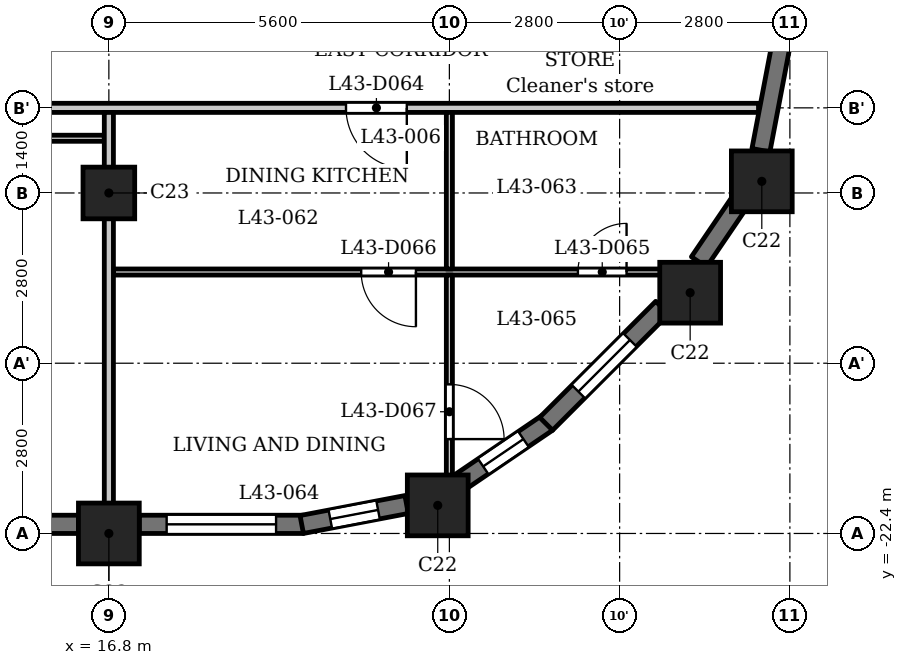
"""IFC4 building model, lengths in metres.
Left out: names, types, materials, properties, quantities, classifications, styles, units other than length and angle.
Written with IfcOpenShell. Run it as: python <this file> out.ifc"""

import sys

from ifc_helpers import new_model, si_unit, direction, frame, frame_2d, origin, origin_2d, place, context, subcontext, project, spatial, rectangle, extrude, element, fill, save


model = new_model("IFC4")
c1 = context("Model", 3, precision=1e-05, world=origin(), true_north=direction((0.0, 1.0)))
c2 = subcontext(c1, "Body", "Model", "MODEL_VIEW")
j1 = project(units=[si_unit("LENGTHUNIT", "METRE"), si_unit("PLANEANGLEUNIT", "RADIAN")], contexts=[c1])
p1 = place(None, origin())
s1 = spatial("IfcSite", under=j1, at=p1, CompositionType="ELEMENT")
p2 = place(p1, origin())
s2 = spatial("IfcBuilding", under=s1, at=p2, CompositionType="ELEMENT")
p3 = place(p2, frame((0.0, 0.0, 167.6)))
s3 = spatial("IfcBuildingStorey", under=s2, at=p3, CompositionType="ELEMENT", Elevation=167.6)
for number, where, z_axis, x_axis in (
    (1, (16.8, -22.4, 0.0), (0.0, 0.0, 1.0), (1.0, 0.0, 0.0)),
    (2, (22.209, -21.938, 0.0), (0.0, 0.0, 1.0), (1.0, 0.0, 0.0)),
    (3, (26.36, -18.44, 0.0), (0.0, 0.0, 1.0), (1.0, 0.0, 0.0)),
    (4, (27.538, -16.609, 0.0), (0.0, 0.0, 1.0), (1.0, 0.0, 0.0)),
):
    element("IfcColumn", number, at=place(p3, frame(where, z_axis=z_axis, x_axis=x_axis)), inside=s3, PredefinedType="COLUMN", context=c2, shape_type="SweptSolid", body=[
        extrude(rectangle(XDim=1.0, YDim=1.0, at=origin_2d()), origin(), (0.0, 0.0, 1.0), 3.5),
    ])
p4 = place(p3, frame((16.8, -16.8, 0.0), z_axis=(0.0, 0.0, 1.0), x_axis=(1.0, 0.0, 0.0)))
e5 = element("IfcColumn", 5, at=p4, inside=s3, PredefinedType="COLUMN", context=c2, shape_type="SweptSolid", body=[
    extrude(rectangle(XDim=0.85, YDim=0.85, at=origin_2d()), origin(), (0.0, 0.0, 1.0), 3.5),
])
p5 = place(p3, frame((11.7, -22.25, 0.0), z_axis=(0.0, 0.0, 1.0), x_axis=(1.0, 0.0, 0.0)))
e6 = element("IfcWall", 6, at=p5, inside=s3, PredefinedType="SOLIDWALL", context=c2, shape_type="SweptSolid", body=[
    extrude(rectangle(XDim=4.6, YDim=0.3, at=frame_2d((2.3, 0.0))), origin(), (0.0, 0.0, 1.0), 2.45),
])
p6 = place(p5, frame((0.5, 0.0, 1.2)))
e7 = element("IfcOpeningElement", 7, at=p6, cuts=e6, PredefinedType="OPENING", context=c2, shape_type="SweptSolid", body=[
    extrude(rectangle(XDim=3.6, YDim=0.95, at=frame_2d((1.8, 0.475))), frame((0.0, 0.16, 0.0), z_axis=(0.0, -1.0, 0.0), x_axis=(1.0, 0.0, 0.0)), (0.0, 0.0, 1.0), 0.32),
])
p7 = place(p3, frame((17.3, -22.25, 0.0), z_axis=(0.0, 0.0, 1.0), x_axis=(1.0, 0.0, 0.0)))
e8 = element("IfcWall", 8, at=p7, inside=s3, PredefinedType="SOLIDWALL", context=c2, shape_type="SweptSolid", body=[
    extrude(rectangle(XDim=2.7, YDim=0.3, at=frame_2d((1.35, 0.0))), origin(), (0.0, 0.0, 1.0), 2.45),
])
p8 = place(p7, frame((0.45, 0.0, 0.9)))
e9 = element("IfcOpeningElement", 9, at=p8, cuts=e8, PredefinedType="OPENING", context=c2, shape_type="SweptSolid", body=[
    extrude(rectangle(XDim=1.8, YDim=1.25, at=frame_2d((0.9, 0.625))), frame((0.0, 0.16, 0.0), z_axis=(0.0, -1.0, 0.0), x_axis=(1.0, 0.0, 0.0)), (0.0, 0.0, 1.0), 0.32),
])
p9 = place(p3, frame((19.972, -22.253, 0.0), z_axis=(0.0, 0.0, 1.0), x_axis=(0.982284988433, 0.187393173565, 0.0)))
e10 = element("IfcWall", 10, at=p9, inside=s3, PredefinedType="SOLIDWALL", context=c2, shape_type="SweptSolid", body=[
    extrude(rectangle(XDim=1.756, YDim=0.3, at=frame_2d((0.878, 0.0))), origin(), (0.0, 0.0, 1.0), 2.45),
])
p10 = place(p9, frame((0.478, 0.0, 0.6)))
e11 = element("IfcOpeningElement", 11, at=p10, cuts=e10, PredefinedType="OPENING", context=c2, shape_type="SweptSolid", body=[
    extrude(rectangle(XDim=0.8, YDim=1.55, at=frame_2d((0.4, 0.775))), frame((0.0, 0.16, 0.0), z_axis=(0.0, -1.0, 0.0), x_axis=(1.0, 0.0, 0.0)), (0.0, 0.0, 1.0), 0.32),
])
p11 = place(p3, frame((22.56, -21.566, 0.0), z_axis=(0.0, 0.0, 1.0), x_axis=(0.82707645233, 0.562089443061, 0.0)))
e12 = element("IfcWall", 12, at=p11, inside=s3, PredefinedType="SOLIDWALL", context=c2, shape_type="SweptSolid", body=[
    extrude(rectangle(XDim=1.756, YDim=0.3, at=frame_2d((0.878, 0.0))), origin(), (0.0, 0.0, 1.0), 2.45),
])
p12 = place(p11, frame((0.478, 0.0, 0.6)))
e13 = element("IfcOpeningElement", 13, at=p12, cuts=e12, PredefinedType="OPENING", context=c2, shape_type="SweptSolid", body=[
    extrude(rectangle(XDim=0.8, YDim=1.55, at=frame_2d((0.4, 0.775))), frame((0.0, 0.16, 0.0), z_axis=(0.0, -1.0, 0.0), x_axis=(1.0, 0.0, 0.0)), (0.0, 0.0, 1.0), 0.32),
])
p13 = place(p3, frame((23.991, -20.597, 0.0), z_axis=(0.0, 0.0, 1.0), x_axis=(0.707106781187, 0.707106781187, 0.0)))
e14 = element("IfcWall", 14, at=p13, inside=s3, PredefinedType="SOLIDWALL", context=c2, shape_type="SweptSolid", body=[
    extrude(rectangle(XDim=2.7, YDim=0.3, at=frame_2d((1.35, 0.0))), origin(), (0.0, 0.0, 1.0), 2.45),
])
p14 = place(p13, frame((0.75, 0.0, 0.6)))
e15 = element("IfcOpeningElement", 15, at=p14, cuts=e14, PredefinedType="OPENING", context=c2, shape_type="SweptSolid", body=[
    extrude(rectangle(XDim=1.2, YDim=1.55, at=frame_2d((0.6, 0.775))), frame((0.0, 0.16, 0.0), z_axis=(0.0, -1.0, 0.0), x_axis=(1.0, 0.0, 0.0)), (0.0, 0.0, 1.0), 0.32),
])
p15 = place(p3, frame((26.504, -17.934, 0.0), z_axis=(0.0, 0.0, 1.0), x_axis=(0.562145470373, 0.827038372833, 0.0)))
e16 = element("IfcWall", 16, at=p15, inside=s3, PredefinedType="SOLIDWALL", context=c2, shape_type="SweptSolid", body=[
    extrude(rectangle(XDim=1.177, YDim=0.3, at=frame_2d((0.588, 0.0))), origin(), (0.0, 0.0, 1.0), 3.2),
])
p16 = place(p3, frame((27.524, -16.097, 0.0), z_axis=(0.0, 0.0, 1.0), x_axis=(0.187259034321, 0.982310569049, 0.0)))
e17 = element("IfcWall", 17, at=p16, inside=s3, PredefinedType="SOLIDWALL", context=c2, shape_type="SweptSolid", body=[
    extrude(rectangle(XDim=1.756, YDim=0.3, at=frame_2d((0.878, 0.0))), origin(), (0.0, 0.0, 1.0), 2.45),
])
p17 = place(p3, frame((16.875, -18.1, 0.0), z_axis=(0.0, 0.0, 1.0), x_axis=(1.0, 0.0, 0.0)))
e18 = element("IfcWall", 18, at=p17, inside=s3, PredefinedType="PARTITIONING", context=c2, shape_type="SweptSolid", body=[
    extrude(rectangle(XDim=9.565, YDim=0.1, at=frame_2d((4.782, 0.0))), origin(), (0.0, 0.0, 1.0), 3.2),
])
p18 = place(p17, frame((7.639, 0.0, 0.0)))
e19 = element("IfcOpeningElement", 19, at=p18, cuts=e18, PredefinedType="OPENING", context=c2, shape_type="SweptSolid", body=[
    extrude(rectangle(XDim=0.8, YDim=2.1, at=frame_2d((0.4, 1.05))), frame((0.0, 0.06, 0.0), z_axis=(0.0, -1.0, 0.0), x_axis=(1.0, 0.0, 0.0)), (0.0, 0.0, 1.0), 0.12),
])
p19 = place(p17, frame((4.075, 0.0, 0.0)))
e20 = element("IfcOpeningElement", 20, at=p19, cuts=e18, PredefinedType="OPENING", context=c2, shape_type="SweptSolid", body=[
    extrude(rectangle(XDim=0.9, YDim=2.1, at=frame_2d((0.45, 1.05))), frame((0.0, 0.06, 0.0), z_axis=(0.0, -1.0, 0.0), x_axis=(1.0, 0.0, 0.0)), (0.0, 0.0, 1.0), 0.12),
])
p20 = place(p3, frame((-16.725, -15.9, 0.0), z_axis=(0.0, 0.0, 1.0), x_axis=(1.0, 0.0, 0.0)))
e21 = element("IfcWall", 21, at=p20, inside=s3, PredefinedType="PARTITIONING", context=c2, shape_type="SweptSolid", body=[
    extrude(rectangle(XDim=33.45, YDim=0.1, at=frame_2d((16.725, 0.0))), origin(), (0.0, 0.0, 1.0), 3.2),
])
p21 = place(p20, frame((9.675, 0.0, 0.0)))
e22 = element("IfcOpeningElement", 22, at=p21, cuts=e21, PredefinedType="OPENING", context=c2, shape_type="SweptSolid", body=[
    extrude(rectangle(XDim=0.8, YDim=2.1, at=frame_2d((0.4, 1.05))), frame((0.0, 0.06, 0.0), z_axis=(0.0, -1.0, 0.0), x_axis=(1.0, 0.0, 0.0)), (0.0, 0.0, 1.0), 0.12),
])
p22 = place(p20, frame((4.075, 0.0, 0.0)))
e23 = element("IfcOpeningElement", 23, at=p22, cuts=e21, PredefinedType="OPENING", context=c2, shape_type="SweptSolid", body=[
    extrude(rectangle(XDim=0.9, YDim=2.1, at=frame_2d((0.45, 1.05))), frame((0.0, 0.06, 0.0), z_axis=(0.0, -1.0, 0.0), x_axis=(1.0, 0.0, 0.0)), (0.0, 0.0, 1.0), 0.12),
])
p23 = place(p20, frame((20.875, 0.0, 0.0)))
e24 = element("IfcOpeningElement", 24, at=p23, cuts=e21, PredefinedType="OPENING", context=c2, shape_type="SweptSolid", body=[
    extrude(rectangle(XDim=0.8, YDim=2.1, at=frame_2d((0.4, 1.05))), frame((0.0, 0.06, 0.0), z_axis=(0.0, -1.0, 0.0), x_axis=(1.0, 0.0, 0.0)), (0.0, 0.0, 1.0), 0.12),
])
p24 = place(p20, frame((15.275, 0.0, 0.0)))
e25 = element("IfcOpeningElement", 25, at=p24, cuts=e21, PredefinedType="OPENING", context=c2, shape_type="SweptSolid", body=[
    extrude(rectangle(XDim=0.9, YDim=2.1, at=frame_2d((0.45, 1.05))), frame((0.0, 0.06, 0.0), z_axis=(0.0, -1.0, 0.0), x_axis=(1.0, 0.0, 0.0)), (0.0, 0.0, 1.0), 0.12),
])
p25 = place(p20, frame((30.825, 0.0, 0.0)))
e26 = element("IfcOpeningElement", 26, at=p25, cuts=e21, PredefinedType="OPENING", context=c2, shape_type="SweptSolid", body=[
    extrude(rectangle(XDim=0.8, YDim=2.1, at=frame_2d((0.4, 1.05))), frame((0.0, 0.06, 0.0), z_axis=(0.0, -1.0, 0.0), x_axis=(1.0, 0.0, 0.0)), (0.0, 0.0, 1.0), 0.12),
])
p26 = place(p20, frame((26.475, 0.0, 0.0)))
e27 = element("IfcOpeningElement", 27, at=p26, cuts=e21, PredefinedType="OPENING", context=c2, shape_type="SweptSolid", body=[
    extrude(rectangle(XDim=0.9, YDim=2.1, at=frame_2d((0.45, 1.05))), frame((0.0, 0.06, 0.0), z_axis=(0.0, -1.0, 0.0), x_axis=(1.0, 0.0, 0.0)), (0.0, 0.0, 1.0), 0.12),
])
p27 = place(p3, frame((14.925, -15.4, 0.0), z_axis=(0.0, 0.0, 1.0), x_axis=(1.0, 0.0, 0.0)))
e28 = element("IfcWall", 28, at=p27, inside=s3, PredefinedType="PARTITIONING", context=c2, shape_type="SweptSolid", body=[
    extrude(rectangle(XDim=12.559, YDim=0.15, at=frame_2d((6.279, 0.0))), origin(), (0.0, 0.0, 1.0), 3.2),
])
p28 = place(p27, frame((5.775, 0.0, 0.0)))
e29 = element("IfcOpeningElement", 29, at=p28, cuts=e28, PredefinedType="OPENING", context=c2, shape_type="SweptSolid", body=[
    extrude(rectangle(XDim=1.0, YDim=2.1, at=frame_2d((0.5, 1.05))), frame((0.0, 0.085, 0.0), z_axis=(0.0, -1.0, 0.0), x_axis=(1.0, 0.0, 0.0)), (0.0, 0.0, 1.0), 0.17),
])
p29 = place(p3, frame((16.8, -22.88, 0.0), z_axis=(0.0, 0.0, 1.0), x_axis=(0.0, 1.0, 0.0)))
e30 = element("IfcWall", 30, at=p29, inside=s3, PredefinedType="PARTITIONING", context=c2, shape_type="SweptSolid", body=[
    extrude(rectangle(XDim=7.405, YDim=0.15, at=frame_2d((3.702, 0.0))), origin(), (0.0, 0.0, 1.0), 3.2),
])
p30 = place(p3, frame((22.4, -21.72, 0.0), z_axis=(0.0, 0.0, 1.0), x_axis=(0.0, 1.0, 0.0)))
e31 = element("IfcWall", 31, at=p30, inside=s3, PredefinedType="PARTITIONING", context=c2, shape_type="SweptSolid", body=[
    extrude(rectangle(XDim=3.57, YDim=0.1, at=frame_2d((1.785, 0.0))), origin(), (0.0, 0.0, 1.0), 3.2),
])
p31 = place(p30, frame((0.872, 0.0, 0.0)))
e32 = element("IfcOpeningElement", 32, at=p31, cuts=e31, PredefinedType="OPENING", context=c2, shape_type="SweptSolid", body=[
    extrude(rectangle(XDim=0.9, YDim=2.1, at=frame_2d((0.45, 1.05))), frame((0.0, 0.06, 0.0), z_axis=(0.0, -1.0, 0.0), x_axis=(1.0, 0.0, 0.0)), (0.0, 0.0, 1.0), 0.12),
])
p32 = place(p3, frame((22.4, -18.05, 0.0), z_axis=(0.0, 0.0, 1.0), x_axis=(0.0, 1.0, 0.0)))
e33 = element("IfcWall", 33, at=p32, inside=s3, PredefinedType="PARTITIONING", context=c2, shape_type="SweptSolid", body=[
    extrude(rectangle(XDim=2.575, YDim=0.1, at=frame_2d((1.288, 0.0))), origin(), (0.0, 0.0, 1.0), 3.2),
])
p33 = place(p28, origin())
e34 = element("IfcDoor", 34, at=p33, inside=s3, OperationType="SINGLE_SWING_RIGHT", PredefinedType="DOOR", context=c2, shape_type="SweptSolid", body=[
    extrude(rectangle(XDim=1.0, YDim=2.1, at=frame_2d((0.5, 1.05))), frame((0.0, 0.025, 0.0), z_axis=(0.0, -1.0, 0.0), x_axis=(1.0, 0.0, 0.0)), (0.0, 0.0, 1.0), 0.05),
])
fill(e29, e34)
p34 = place(p18, origin())
e35 = element("IfcDoor", 35, at=p34, inside=s3, OperationType="SINGLE_SWING_LEFT", PredefinedType="DOOR", context=c2, shape_type="SweptSolid", body=[
    extrude(rectangle(XDim=0.8, YDim=2.1, at=frame_2d((0.4, 1.05))), frame((0.0, 0.025, 0.0), z_axis=(0.0, -1.0, 0.0), x_axis=(1.0, 0.0, 0.0)), (0.0, 0.0, 1.0), 0.05),
])
fill(e19, e35)
p35 = place(p19, origin())
e36 = element("IfcDoor", 36, at=p35, inside=s3, OperationType="SINGLE_SWING_RIGHT", PredefinedType="DOOR", context=c2, shape_type="SweptSolid", body=[
    extrude(rectangle(XDim=0.9, YDim=2.1, at=frame_2d((0.45, 1.05))), frame((0.0, 0.025, 0.0), z_axis=(0.0, -1.0, 0.0), x_axis=(1.0, 0.0, 0.0)), (0.0, 0.0, 1.0), 0.05),
])
fill(e20, e36)
p36 = place(p31, origin())
e37 = element("IfcDoor", 37, at=p36, inside=s3, OperationType="SINGLE_SWING_LEFT", PredefinedType="DOOR", context=c2, shape_type="SweptSolid", body=[
    extrude(rectangle(XDim=0.9, YDim=2.1, at=frame_2d((0.45, 1.05))), frame((0.0, 0.025, 0.0), z_axis=(0.0, -1.0, 0.0), x_axis=(1.0, 0.0, 0.0)), (0.0, 0.0, 1.0), 0.05),
])
fill(e32, e37)
p37 = place(p8, origin())
e38 = element("IfcWindow", 38, at=p37, inside=s3, PartitioningType="SINGLE_PANEL", PredefinedType="WINDOW", context=c2, shape_type="SweptSolid", body=[
    extrude(rectangle(XDim=1.8, YDim=1.25, at=frame_2d((0.9, 0.625))), frame((0.0, 0.03, 0.0), z_axis=(0.0, -1.0, 0.0), x_axis=(1.0, 0.0, 0.0)), (0.0, 0.0, 1.0), 0.06),
])
fill(e9, e38)
p38 = place(p10, origin())
e39 = element("IfcWindow", 39, at=p38, inside=s3, PartitioningType="SINGLE_PANEL", PredefinedType="WINDOW", context=c2, shape_type="SweptSolid", body=[
    extrude(rectangle(XDim=0.8, YDim=1.55, at=frame_2d((0.4, 0.775))), frame((0.0, 0.03, 0.0), z_axis=(0.0, -1.0, 0.0), x_axis=(1.0, 0.0, 0.0)), (0.0, 0.0, 1.0), 0.06),
])
fill(e11, e39)
p39 = place(p12, origin())
e40 = element("IfcWindow", 40, at=p39, inside=s3, PartitioningType="SINGLE_PANEL", PredefinedType="WINDOW", context=c2, shape_type="SweptSolid", body=[
    extrude(rectangle(XDim=0.8, YDim=1.55, at=frame_2d((0.4, 0.775))), frame((0.0, 0.03, 0.0), z_axis=(0.0, -1.0, 0.0), x_axis=(1.0, 0.0, 0.0)), (0.0, 0.0, 1.0), 0.06),
])
fill(e13, e40)
p40 = place(p14, origin())
e41 = element("IfcWindow", 41, at=p40, inside=s3, PartitioningType="SINGLE_PANEL", PredefinedType="WINDOW", context=c2, shape_type="SweptSolid", body=[
    extrude(rectangle(XDim=1.2, YDim=1.55, at=frame_2d((0.6, 0.775))), frame((0.0, 0.03, 0.0), z_axis=(0.0, -1.0, 0.0), x_axis=(1.0, 0.0, 0.0)), (0.0, 0.0, 1.0), 0.06),
])
fill(e15, e41)
save(model, sys.argv[1])
